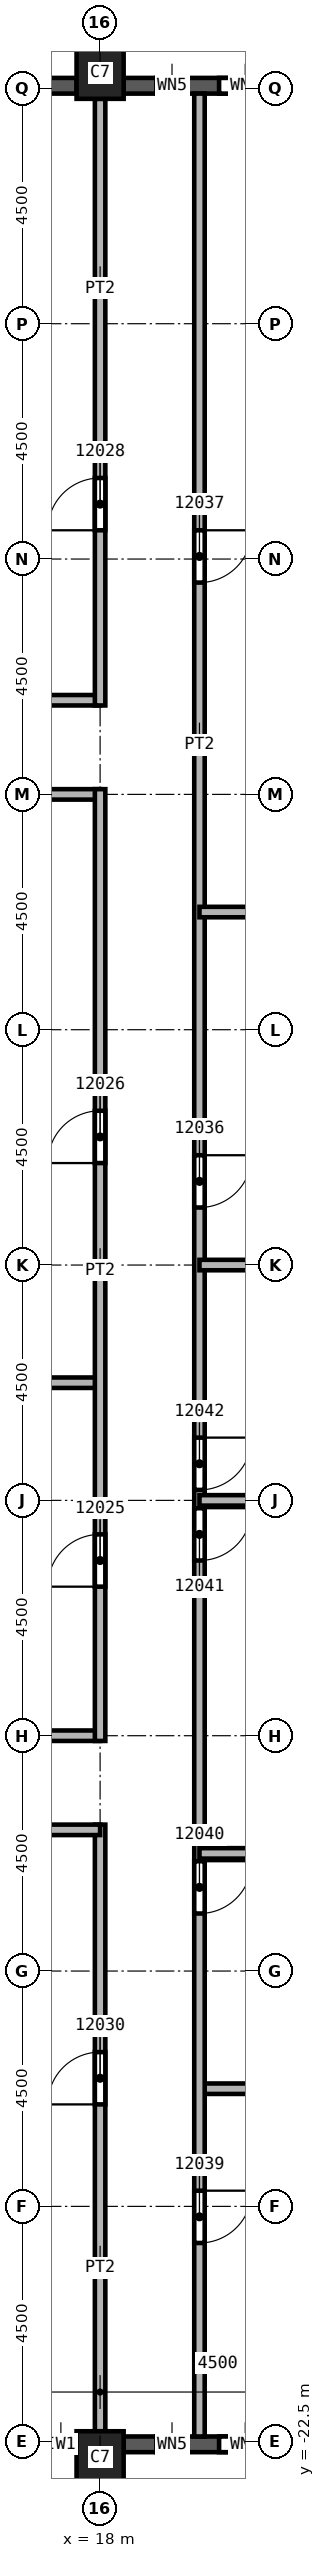
"""IFC4 building model, lengths in metres.
Left out: names, types, materials, properties, quantities, classifications, styles, units other than length and angle.
Written with IfcOpenShell. Run it as: python <this file> out.ifc"""

import sys

from ifc_helpers import new_model, si_unit, direction, frame, frame_2d, origin, origin_2d, place, context, subcontext, project, spatial, rectangle, extrude, element, fill, save


model = new_model("IFC4")
c1 = context("Model", 3, precision=1e-05, world=origin(), true_north=direction((0.0, 1.0)))
c2 = subcontext(c1, "Body", "Model", "MODEL_VIEW")
j1 = project(units=[si_unit("LENGTHUNIT", "METRE"), si_unit("PLANEANGLEUNIT", "RADIAN")], contexts=[c1])
p1 = place(None, origin())
s1 = spatial("IfcSite", under=j1, at=p1, CompositionType="ELEMENT")
p2 = place(p1, origin())
s2 = spatial("IfcBuilding", under=s1, at=p2, CompositionType="ELEMENT")
p3 = place(p2, frame((0.0, 0.0, 196.0)))
s3 = spatial("IfcBuildingStorey", under=s2, at=p3, CompositionType="ELEMENT", Elevation=196.0)
for number, where, z_axis, x_axis in (
    (1, (18.0, 22.8, 0.0), (0.0, 0.0, 1.0), (1.0, 0.0, 0.0)),
    (2, (18.0, -22.8, 0.0), (0.0, 0.0, 1.0), (1.0, 0.0, 0.0)),
):
    element("IfcColumn", number, at=place(p3, frame(where, z_axis=z_axis, x_axis=x_axis)), inside=s3, PredefinedType="COLUMN", context=c2, shape_type="SweptSolid", body=[
        extrude(rectangle(XDim=0.9, YDim=1.0, at=origin_2d()), origin(), (0.0, 0.0, 1.0), 3.72),
    ])
p4 = place(p3, frame((13.95, -22.55, 0.0), z_axis=(0.0, 0.0, 1.0), x_axis=(1.0, 0.0, 0.0)))
e3 = element("IfcWall", 3, at=p4, inside=s3, PredefinedType="SOLIDWALL", context=c2, shape_type="SweptSolid", body=[
    extrude(rectangle(XDim=3.6, YDim=0.3, at=frame_2d((1.8, 0.0))), origin(), (0.0, 0.0, 1.0), 3.12),
])
p5 = place(p4, frame((0.6, 0.0, 0.8)))
e4 = element("IfcOpeningElement", 4, at=p5, cuts=e3, PredefinedType="OPENING", context=c2, shape_type="SweptSolid", body=[
    extrude(rectangle(XDim=2.4, YDim=1.95, at=frame_2d((1.2, 0.975))), frame((0.0, 0.15, 0.0), z_axis=(0.0, -1.0, 0.0), x_axis=(1.0, 0.0, 0.0)), (0.0, 0.0, 1.0), 0.3),
])
p6 = place(p3, frame((18.45, -22.55, 0.0), z_axis=(0.0, 0.0, 1.0), x_axis=(1.0, 0.0, 0.0)))
e5 = element("IfcWall", 5, at=p6, inside=s3, PredefinedType="SOLIDWALL", context=c2, shape_type="SweptSolid", body=[
    extrude(rectangle(XDim=3.6, YDim=0.3, at=frame_2d((1.8, 0.0))), origin(), (0.0, 0.0, 1.0), 3.12),
])
p7 = place(p6, frame((0.625, 0.0, 0.8)))
e6 = element("IfcOpeningElement", 6, at=p7, cuts=e5, PredefinedType="OPENING", context=c2, shape_type="SweptSolid", body=[
    extrude(rectangle(XDim=0.6, YDim=1.95, at=frame_2d((0.3, 0.975))), frame((0.0, 0.15, 0.0), z_axis=(0.0, -1.0, 0.0), x_axis=(1.0, 0.0, 0.0)), (0.0, 0.0, 1.0), 0.3),
])
p8 = place(p6, frame((1.825, 0.0, 0.8)))
e7 = element("IfcOpeningElement", 7, at=p8, cuts=e5, PredefinedType="OPENING", context=c2, shape_type="SweptSolid", body=[
    extrude(rectangle(XDim=1.0, YDim=1.95, at=frame_2d((0.5, 0.975))), frame((0.0, 0.15, 0.0), z_axis=(0.0, -1.0, 0.0), x_axis=(1.0, 0.0, 0.0)), (0.0, 0.0, 1.0), 0.3),
])
p9 = place(p3, frame((22.05, 22.55, 0.0), z_axis=(0.0, 0.0, 1.0), x_axis=(-1.0, 0.0, 0.0)))
e8 = element("IfcWall", 8, at=p9, inside=s3, PredefinedType="SOLIDWALL", context=c2, shape_type="SweptSolid", body=[
    extrude(rectangle(XDim=3.6, YDim=0.3, at=frame_2d((1.8, 0.0))), origin(), (0.0, 0.0, 1.0), 3.12),
])
p10 = place(p9, frame((0.775, 0.0, 0.8)))
e9 = element("IfcOpeningElement", 9, at=p10, cuts=e8, PredefinedType="OPENING", context=c2, shape_type="SweptSolid", body=[
    extrude(rectangle(XDim=1.0, YDim=1.95, at=frame_2d((0.5, 0.975))), frame((0.0, 0.15, 0.0), z_axis=(0.0, -1.0, 0.0), x_axis=(1.0, 0.0, 0.0)), (0.0, 0.0, 1.0), 0.3),
])
p11 = place(p9, frame((2.375, 0.0, 0.8)))
e10 = element("IfcOpeningElement", 10, at=p11, cuts=e8, PredefinedType="OPENING", context=c2, shape_type="SweptSolid", body=[
    extrude(rectangle(XDim=0.6, YDim=1.95, at=frame_2d((0.3, 0.975))), frame((0.0, 0.15, 0.0), z_axis=(0.0, -1.0, 0.0), x_axis=(1.0, 0.0, 0.0)), (0.0, 0.0, 1.0), 0.3),
])
p12 = place(p3, frame((17.55, 22.55, 0.0), z_axis=(0.0, 0.0, 1.0), x_axis=(-1.0, 0.0, 0.0)))
e11 = element("IfcWall", 11, at=p12, inside=s3, PredefinedType="SOLIDWALL", context=c2, shape_type="SweptSolid", body=[
    extrude(rectangle(XDim=3.6, YDim=0.3, at=frame_2d((1.8, 0.0))), origin(), (0.0, 0.0, 1.0), 3.12),
])
p13 = place(p12, frame((0.6, 0.0, 0.8)))
e12 = element("IfcOpeningElement", 12, at=p13, cuts=e11, PredefinedType="OPENING", context=c2, shape_type="SweptSolid", body=[
    extrude(rectangle(XDim=2.4, YDim=1.95, at=frame_2d((1.2, 0.975))), frame((0.0, 0.15, 0.0), z_axis=(0.0, -1.0, 0.0), x_axis=(1.0, 0.0, 0.0)), (0.0, 0.0, 1.0), 0.3),
])
for number, where, z_axis, x_axis in (
    (13, (13.5, -9.0, 0.0), (0.0, 0.0, 1.0), (1.0, 0.0, 0.0)),
    (14, (13.5, -2.25, 0.0), (0.0, 0.0, 1.0), (1.0, 0.0, 0.0)),
    (15, (18.0, 9.0, 0.0), (0.0, 0.0, 1.0), (-1.0, 0.0, 0.0)),
):
    element("IfcWall", number, at=place(p3, frame(where, z_axis=z_axis, x_axis=x_axis)), inside=s3, PredefinedType="PARTITIONING", context=c2, shape_type="SweptSolid", body=[
        extrude(rectangle(XDim=4.5, YDim=0.2, at=frame_2d((2.25, 0.0))), origin(), (0.0, 0.0, 1.0), 3.72),
    ])
p14 = place(p3, frame((14.4, 10.8, 0.0), z_axis=(0.0, 0.0, 1.0), x_axis=(1.0, 0.0, 0.0)))
e16 = element("IfcWall", 16, at=p14, inside=s3, PredefinedType="PARTITIONING", context=c2, shape_type="SweptSolid", body=[
    extrude(rectangle(XDim=3.6, YDim=0.2, at=frame_2d((1.8, 0.0))), origin(), (0.0, 0.0, 1.0), 3.72),
])
p15 = place(p3, frame((18.0, -22.3, 0.0), z_axis=(0.0, 0.0, 1.0), x_axis=(0.0, 1.0, 0.0)))
e17 = element("IfcWall", 17, at=p15, inside=s3, PredefinedType="PARTITIONING", context=c2, shape_type="SweptSolid", body=[
    extrude(rectangle(XDim=11.6, YDim=0.2, at=frame_2d((5.8, 0.0))), origin(), (0.0, 0.0, 1.0), 3.72),
])
p16 = place(p15, frame((6.25, 0.0, 0.0)))
e18 = element("IfcOpeningElement", 18, at=p16, cuts=e17, PredefinedType="OPENING", context=c2, shape_type="SweptSolid", body=[
    extrude(rectangle(XDim=1.0, YDim=2.1, at=frame_2d((0.5, 1.05))), frame((0.0, 0.1, 0.0), z_axis=(0.0, -1.0, 0.0), x_axis=(1.0, 0.0, 0.0)), (0.0, 0.0, 1.0), 0.2),
])
p17 = place(p3, frame((18.0, -10.8, 0.0), z_axis=(0.0, 0.0, 1.0), x_axis=(-1.0, 0.0, 0.0)))
e19 = element("IfcWall", 19, at=p17, inside=s3, PredefinedType="PARTITIONING", context=c2, shape_type="SweptSolid", body=[
    extrude(rectangle(XDim=3.6, YDim=0.2, at=frame_2d((1.8, 0.0))), origin(), (0.0, 0.0, 1.0), 3.72),
])
p18 = place(p3, frame((18.0, -9.1, 0.0), z_axis=(0.0, 0.0, 1.0), x_axis=(0.0, 1.0, 0.0)))
e20 = element("IfcWall", 20, at=p18, inside=s3, PredefinedType="PARTITIONING", context=c2, shape_type="SweptSolid", body=[
    extrude(rectangle(XDim=18.2, YDim=0.2, at=frame_2d((9.1, 0.0))), origin(), (0.0, 0.0, 1.0), 3.72),
])
p19 = place(p18, frame((2.95, 0.0, 0.0)))
e21 = element("IfcOpeningElement", 21, at=p19, cuts=e20, PredefinedType="OPENING", context=c2, shape_type="SweptSolid", body=[
    extrude(rectangle(XDim=1.0, YDim=2.1, at=frame_2d((0.5, 1.05))), frame((0.0, 0.1, 0.0), z_axis=(0.0, -1.0, 0.0), x_axis=(1.0, 0.0, 0.0)), (0.0, 0.0, 1.0), 0.2),
])
p20 = place(p18, frame((11.05, 0.0, 0.0)))
e22 = element("IfcOpeningElement", 22, at=p20, cuts=e20, PredefinedType="OPENING", context=c2, shape_type="SweptSolid", body=[
    extrude(rectangle(XDim=1.0, YDim=2.1, at=frame_2d((0.5, 1.05))), frame((0.0, 0.1, 0.0), z_axis=(0.0, -1.0, 0.0), x_axis=(1.0, 0.0, 0.0)), (0.0, 0.0, 1.0), 0.2),
])
p21 = place(p3, frame((18.0, 10.7, 0.0), z_axis=(0.0, 0.0, 1.0), x_axis=(0.0, 1.0, 0.0)))
e23 = element("IfcWall", 23, at=p21, inside=s3, PredefinedType="PARTITIONING", context=c2, shape_type="SweptSolid", body=[
    extrude(rectangle(XDim=11.6, YDim=0.2, at=frame_2d((5.8, 0.0))), origin(), (0.0, 0.0, 1.0), 3.72),
])
p22 = place(p21, frame((3.35, 0.0, 0.0)))
e24 = element("IfcOpeningElement", 24, at=p22, cuts=e23, PredefinedType="OPENING", context=c2, shape_type="SweptSolid", body=[
    extrude(rectangle(XDim=1.0, YDim=2.1, at=frame_2d((0.5, 1.05))), frame((0.0, 0.1, 0.0), z_axis=(0.0, -1.0, 0.0), x_axis=(1.0, 0.0, 0.0)), (0.0, 0.0, 1.0), 0.2),
])
p23 = place(p3, frame((19.9, -15.75, 0.0), z_axis=(0.0, 0.0, 1.0), x_axis=(1.0, 0.0, 0.0)))
e25 = element("IfcWall", 25, at=p23, inside=s3, PredefinedType="PARTITIONING", context=c2, shape_type="SweptSolid", body=[
    extrude(rectangle(XDim=3.55, YDim=0.2, at=frame_2d((1.775, 0.0))), origin(), (0.0, 0.0, 1.0), 3.72),
])
p24 = place(p3, frame((19.9, 22.4, 0.0), z_axis=(0.0, 0.0, 1.0), x_axis=(0.0, -1.0, 0.0)))
e26 = element("IfcWall", 26, at=p24, inside=s3, PredefinedType="PARTITIONING", context=c2, shape_type="SweptSolid", body=[
    extrude(rectangle(XDim=44.8, YDim=0.2, at=frame_2d((22.4, 0.0))), origin(), (0.0, 0.0, 1.0), 3.72),
])
p25 = place(p24, frame((20.3, 0.0, 0.0)))
e27 = element("IfcOpeningElement", 27, at=p25, cuts=e26, PredefinedType="OPENING", context=c2, shape_type="SweptSolid", body=[
    extrude(rectangle(XDim=1.0, YDim=2.1, at=frame_2d((0.5, 1.05))), frame((0.0, 0.1, 0.0), z_axis=(0.0, -1.0, 0.0), x_axis=(1.0, 0.0, 0.0)), (0.0, 0.0, 1.0), 0.2),
])
p26 = place(p24, frame((8.35, 0.0, 0.0)))
e28 = element("IfcOpeningElement", 28, at=p26, cuts=e26, PredefinedType="OPENING", context=c2, shape_type="SweptSolid", body=[
    extrude(rectangle(XDim=1.0, YDim=2.1, at=frame_2d((0.5, 1.05))), frame((0.0, 0.1, 0.0), z_axis=(0.0, -1.0, 0.0), x_axis=(1.0, 0.0, 0.0)), (0.0, 0.0, 1.0), 0.2),
])
p27 = place(p24, frame((40.1, 0.0, 0.0)))
e29 = element("IfcOpeningElement", 29, at=p27, cuts=e26, PredefinedType="OPENING", context=c2, shape_type="SweptSolid", body=[
    extrude(rectangle(XDim=1.0, YDim=2.1, at=frame_2d((0.5, 1.05))), frame((0.0, 0.1, 0.0), z_axis=(0.0, -1.0, 0.0), x_axis=(1.0, 0.0, 0.0)), (0.0, 0.0, 1.0), 0.2),
])
p28 = place(p24, frame((33.8, 0.0, 0.0)))
e30 = element("IfcOpeningElement", 30, at=p28, cuts=e26, PredefinedType="OPENING", context=c2, shape_type="SweptSolid", body=[
    extrude(rectangle(XDim=1.0, YDim=2.1, at=frame_2d((0.5, 1.05))), frame((0.0, 0.1, 0.0), z_axis=(0.0, -1.0, 0.0), x_axis=(1.0, 0.0, 0.0)), (0.0, 0.0, 1.0), 0.2),
])
p29 = place(p24, frame((27.05, 0.0, 0.0)))
e31 = element("IfcOpeningElement", 31, at=p29, cuts=e26, PredefinedType="OPENING", context=c2, shape_type="SweptSolid", body=[
    extrude(rectangle(XDim=1.0, YDim=2.1, at=frame_2d((0.5, 1.05))), frame((0.0, 0.1, 0.0), z_axis=(0.0, -1.0, 0.0), x_axis=(1.0, 0.0, 0.0)), (0.0, 0.0, 1.0), 0.2),
])
p30 = place(p24, frame((25.7, 0.0, 0.0)))
e32 = element("IfcOpeningElement", 32, at=p30, cuts=e26, PredefinedType="OPENING", context=c2, shape_type="SweptSolid", body=[
    extrude(rectangle(XDim=1.0, YDim=2.1, at=frame_2d((0.5, 1.05))), frame((0.0, 0.1, 0.0), z_axis=(0.0, -1.0, 0.0), x_axis=(1.0, 0.0, 0.0)), (0.0, 0.0, 1.0), 0.2),
])
for number, where, z_axis, x_axis in (
    (33, (19.9, -11.25, 0.0), (0.0, 0.0, 1.0), (1.0, 0.0, 0.0)),
    (34, (19.9, -4.5, 0.0), (0.0, 0.0, 1.0), (1.0, 0.0, 0.0)),
    (35, (19.9, 6.75, 0.0), (0.0, 0.0, 1.0), (1.0, 0.0, 0.0)),
):
    element("IfcWall", number, at=place(p3, frame(where, z_axis=z_axis, x_axis=x_axis)), inside=s3, PredefinedType="PARTITIONING", context=c2, shape_type="SweptSolid", body=[
        extrude(rectangle(XDim=6.7, YDim=0.2, at=frame_2d((3.35, 0.0))), origin(), (0.0, 0.0, 1.0), 3.72),
    ])
p31 = place(p3, frame((26.5, 0.0, 0.0), z_axis=(0.0, 0.0, 1.0), x_axis=(-1.0, 0.0, 0.0)))
e36 = element("IfcWall", 36, at=p31, inside=s3, PredefinedType="PARTITIONING", context=c2, shape_type="SweptSolid", body=[
    extrude(rectangle(XDim=6.6, YDim=0.2, at=frame_2d((3.3, 0.0))), origin(), (0.0, 0.0, 1.0), 3.72),
])
p32 = place(p19, origin())
e37 = element("IfcDoor", 37, at=p32, inside=s3, OperationType="SINGLE_SWING_RIGHT", PredefinedType="DOOR", context=c2, shape_type="SweptSolid", body=[
    extrude(rectangle(XDim=1.0, YDim=2.1, at=frame_2d((0.5, 1.05))), frame((0.0, 0.025, 0.0), z_axis=(0.0, -1.0, 0.0), x_axis=(1.0, 0.0, 0.0)), (0.0, 0.0, 1.0), 0.05),
])
fill(e21, e37)
p33 = place(p20, origin())
e38 = element("IfcDoor", 38, at=p33, inside=s3, OperationType="SINGLE_SWING_LEFT", PredefinedType="DOOR", context=c2, shape_type="SweptSolid", body=[
    extrude(rectangle(XDim=1.0, YDim=2.1, at=frame_2d((0.5, 1.05))), frame((0.0, 0.025, 0.0), z_axis=(0.0, -1.0, 0.0), x_axis=(1.0, 0.0, 0.0)), (0.0, 0.0, 1.0), 0.05),
])
fill(e22, e38)
p34 = place(p22, origin())
e39 = element("IfcDoor", 39, at=p34, inside=s3, OperationType="SINGLE_SWING_LEFT", PredefinedType="DOOR", context=c2, shape_type="SweptSolid", body=[
    extrude(rectangle(XDim=1.0, YDim=2.1, at=frame_2d((0.5, 1.05))), frame((0.0, 0.025, 0.0), z_axis=(0.0, -1.0, 0.0), x_axis=(1.0, 0.0, 0.0)), (0.0, 0.0, 1.0), 0.05),
])
fill(e24, e39)
p35 = place(p16, origin())
e40 = element("IfcDoor", 40, at=p35, inside=s3, OperationType="SINGLE_SWING_LEFT", PredefinedType="DOOR", context=c2, shape_type="SweptSolid", body=[
    extrude(rectangle(XDim=1.0, YDim=2.1, at=frame_2d((0.5, 1.05))), frame((0.0, 0.025, 0.0), z_axis=(0.0, -1.0, 0.0), x_axis=(1.0, 0.0, 0.0)), (0.0, 0.0, 1.0), 0.05),
])
fill(e18, e40)
p36 = place(p25, origin())
e41 = element("IfcDoor", 41, at=p36, inside=s3, OperationType="SINGLE_SWING_LEFT", PredefinedType="DOOR", context=c2, shape_type="SweptSolid", body=[
    extrude(rectangle(XDim=1.0, YDim=2.1, at=frame_2d((0.5, 1.05))), frame((0.0, 0.025, 0.0), z_axis=(0.0, -1.0, 0.0), x_axis=(1.0, 0.0, 0.0)), (0.0, 0.0, 1.0), 0.05),
])
fill(e27, e41)
p37 = place(p26, origin())
e42 = element("IfcDoor", 42, at=p37, inside=s3, OperationType="SINGLE_SWING_RIGHT", PredefinedType="DOOR", context=c2, shape_type="SweptSolid", body=[
    extrude(rectangle(XDim=1.0, YDim=2.1, at=frame_2d((0.5, 1.05))), frame((0.0, 0.025, 0.0), z_axis=(0.0, -1.0, 0.0), x_axis=(1.0, 0.0, 0.0)), (0.0, 0.0, 1.0), 0.05),
])
fill(e28, e42)
p38 = place(p27, origin())
e43 = element("IfcDoor", 43, at=p38, inside=s3, OperationType="SINGLE_SWING_RIGHT", PredefinedType="DOOR", context=c2, shape_type="SweptSolid", body=[
    extrude(rectangle(XDim=1.0, YDim=2.1, at=frame_2d((0.5, 1.05))), frame((0.0, 0.025, 0.0), z_axis=(0.0, -1.0, 0.0), x_axis=(1.0, 0.0, 0.0)), (0.0, 0.0, 1.0), 0.05),
])
fill(e29, e43)
p39 = place(p28, origin())
e44 = element("IfcDoor", 44, at=p39, inside=s3, OperationType="SINGLE_SWING_LEFT", PredefinedType="DOOR", context=c2, shape_type="SweptSolid", body=[
    extrude(rectangle(XDim=1.0, YDim=2.1, at=frame_2d((0.5, 1.05))), frame((0.0, 0.025, 0.0), z_axis=(0.0, -1.0, 0.0), x_axis=(1.0, 0.0, 0.0)), (0.0, 0.0, 1.0), 0.05),
])
fill(e30, e44)
p40 = place(p29, origin())
e45 = element("IfcDoor", 45, at=p40, inside=s3, OperationType="SINGLE_SWING_RIGHT", PredefinedType="DOOR", context=c2, shape_type="SweptSolid", body=[
    extrude(rectangle(XDim=1.0, YDim=2.1, at=frame_2d((0.5, 1.05))), frame((0.0, 0.025, 0.0), z_axis=(0.0, -1.0, 0.0), x_axis=(1.0, 0.0, 0.0)), (0.0, 0.0, 1.0), 0.05),
])
fill(e31, e45)
p41 = place(p30, origin())
e46 = element("IfcDoor", 46, at=p41, inside=s3, OperationType="SINGLE_SWING_LEFT", PredefinedType="DOOR", context=c2, shape_type="SweptSolid", body=[
    extrude(rectangle(XDim=1.0, YDim=2.1, at=frame_2d((0.5, 1.05))), frame((0.0, 0.025, 0.0), z_axis=(0.0, -1.0, 0.0), x_axis=(1.0, 0.0, 0.0)), (0.0, 0.0, 1.0), 0.05),
])
fill(e32, e46)
p42 = place(p7, origin())
e47 = element("IfcWindow", 47, at=p42, inside=s3, PartitioningType="SINGLE_PANEL", PredefinedType="WINDOW", context=c2, shape_type="SweptSolid", body=[
    extrude(rectangle(XDim=0.6, YDim=1.95, at=frame_2d((0.3, 0.975))), frame((0.0, 0.03, 0.0), z_axis=(0.0, -1.0, 0.0), x_axis=(1.0, 0.0, 0.0)), (0.0, 0.0, 1.0), 0.06),
])
fill(e6, e47)
p43 = place(p8, origin())
e48 = element("IfcWindow", 48, at=p43, inside=s3, PartitioningType="SINGLE_PANEL", PredefinedType="WINDOW", context=c2, shape_type="SweptSolid", body=[
    extrude(rectangle(XDim=1.0, YDim=1.95, at=frame_2d((0.5, 0.975))), frame((0.0, 0.03, 0.0), z_axis=(0.0, -1.0, 0.0), x_axis=(1.0, 0.0, 0.0)), (0.0, 0.0, 1.0), 0.06),
])
fill(e7, e48)
p44 = place(p10, origin())
e49 = element("IfcWindow", 49, at=p44, inside=s3, PartitioningType="SINGLE_PANEL", PredefinedType="WINDOW", context=c2, shape_type="SweptSolid", body=[
    extrude(rectangle(XDim=1.0, YDim=1.95, at=frame_2d((0.5, 0.975))), frame((0.0, 0.03, 0.0), z_axis=(0.0, -1.0, 0.0), x_axis=(1.0, 0.0, 0.0)), (0.0, 0.0, 1.0), 0.06),
])
fill(e9, e49)
p45 = place(p11, origin())
e50 = element("IfcWindow", 50, at=p45, inside=s3, PartitioningType="SINGLE_PANEL", PredefinedType="WINDOW", context=c2, shape_type="SweptSolid", body=[
    extrude(rectangle(XDim=0.6, YDim=1.95, at=frame_2d((0.3, 0.975))), frame((0.0, 0.03, 0.0), z_axis=(0.0, -1.0, 0.0), x_axis=(1.0, 0.0, 0.0)), (0.0, 0.0, 1.0), 0.06),
])
fill(e10, e50)
save(model, sys.argv[1])
